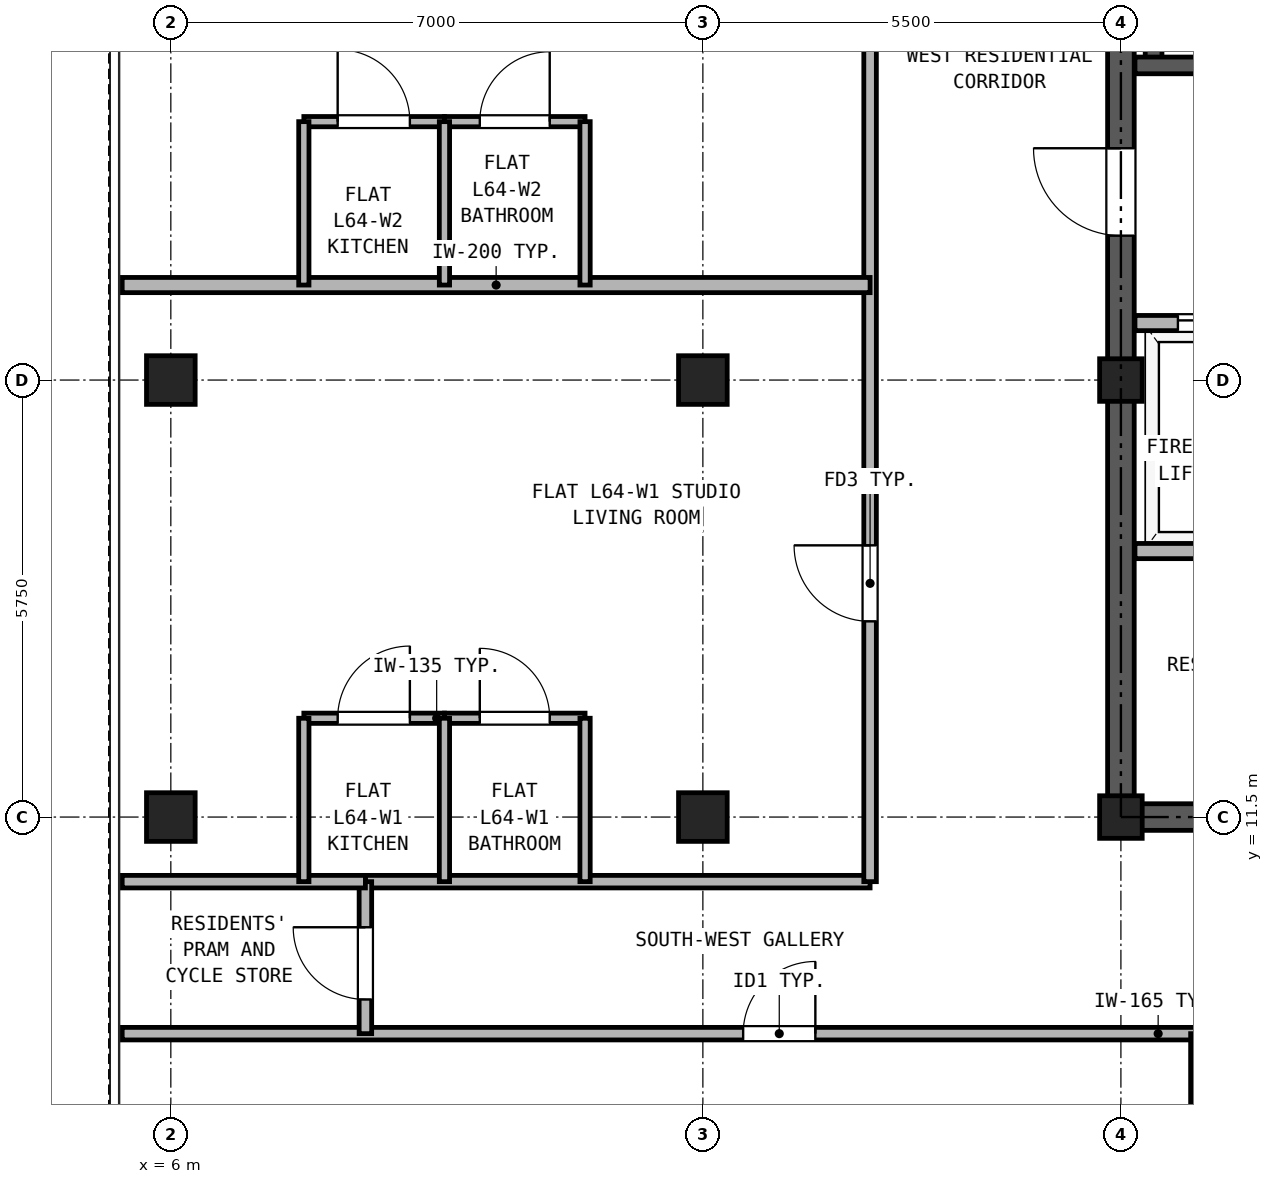
"""IFC4 building model, lengths in metres.
Left out: names, types, materials, properties, quantities, classifications, styles, units other than length and angle.
Written with IfcOpenShell. Run it as: python <this file> out.ifc"""

import sys

from ifc_helpers import new_model, si_unit, direction, frame, frame_2d, origin, origin_2d, place, context, subcontext, project, spatial, rectangle, hollow_rectangle, extrude, source, transform, mapped, element, fill, save


model = new_model("IFC4")
c1 = context("Model", 3, precision=1e-05, world=origin(), true_north=direction((0.0, 1.0)))
c2 = subcontext(c1, "Body", "Model", "MODEL_VIEW")
j1 = project(units=[si_unit("LENGTHUNIT", "METRE"), si_unit("PLANEANGLEUNIT", "RADIAN")], contexts=[c1])
p1 = place(None, origin())
s1 = spatial("IfcSite", under=j1, at=p1, CompositionType="ELEMENT")
p2 = place(p1, origin())
s2 = spatial("IfcBuilding", under=s1, at=p2, CompositionType="ELEMENT")
p3 = place(p2, frame((0.0, 0.0, 226.5)))
s3 = spatial("IfcBuildingStorey", under=s2, at=p3, CompositionType="ELEMENT", Elevation=226.5)
m1 = source(origin(), c2, "Body", "SweptSolid", [
    extrude(hollow_rectangle(XDim=0.64, YDim=0.64, WallThickness=0.035, at=origin_2d()), origin(), (0.0, 0.0, 1.0), 2.98),
])
for number, where, z_axis, x_axis in (
    (1, (6.0, 11.5, 0.0), (0.0, 0.0, 1.0), (1.0, 0.0, 0.0)),
    (2, (6.0, 17.25, 0.0), (0.0, 0.0, 1.0), (1.0, 0.0, 0.0)),
    (3, (13.0, 11.5, 0.0), (0.0, 0.0, 1.0), (1.0, 0.0, 0.0)),
    (4, (13.0, 17.25, 0.0), (0.0, 0.0, 1.0), (1.0, 0.0, 0.0)),
):
    element("IfcColumn", number, at=place(p3, frame(where, z_axis=z_axis, x_axis=x_axis)), inside=s3, PredefinedType="COLUMN", context=c2, shape_type="MappedRepresentation", body=[
        mapped(m1, transform((0.0, 0.0, 0.0), x_axis=(1.0, 0.0, 0.0), y_axis=(0.0, 1.0, 0.0), z_axis=(0.0, 0.0, 1.0), scale=1.0)),
    ])
m2 = source(origin(), c2, "Body", "SweptSolid", [
    extrude(hollow_rectangle(XDim=0.56, YDim=0.56, WallThickness=0.03, at=origin_2d()), origin(), (0.0, 0.0, 1.0), 2.98),
])
for number, where, z_axis, x_axis in (
    (5, (18.5, 11.5, 0.0), (0.0, 0.0, 1.0), (1.0, 0.0, 0.0)),
    (6, (18.5, 17.25, 0.0), (0.0, 0.0, 1.0), (1.0, 0.0, 0.0)),
):
    element("IfcColumn", number, at=place(p3, frame(where, z_axis=z_axis, x_axis=x_axis)), inside=s3, PredefinedType="COLUMN", context=c2, shape_type="MappedRepresentation", body=[
        mapped(m2, transform((0.0, 0.0, 0.0), x_axis=(1.0, 0.0, 0.0), y_axis=(0.0, 1.0, 0.0), z_axis=(0.0, 0.0, 1.0), scale=1.0)),
    ])
p4 = place(p3, frame((18.325, 11.5, 0.0), z_axis=(0.0, 0.0, 1.0), x_axis=(1.0, 0.0, 0.0)))
e7 = element("IfcWall", 7, at=p4, inside=s3, PredefinedType="SHEAR", context=c2, shape_type="SweptSolid", body=[
    extrude(rectangle(XDim=10.35, YDim=0.35, at=frame_2d((5.175, 0.0))), origin(), (0.0, 0.0, 1.0), 2.98),
])
p5 = place(p4, frame((1.775, 0.0, 0.0)))
e8 = element("IfcOpeningElement", 8, at=p5, cuts=e7, PredefinedType="OPENING", context=c2, shape_type="SweptSolid", body=[
    extrude(rectangle(XDim=0.95, YDim=2.15, at=frame_2d((0.475, 1.075))), frame((0.0, 0.185, 0.0), z_axis=(0.0, -1.0, 0.0), x_axis=(1.0, 0.0, 0.0)), (0.0, 0.0, 1.0), 0.37),
])
p6 = place(p4, frame((5.275, 0.0, 0.0)))
e9 = element("IfcOpeningElement", 9, at=p6, cuts=e7, PredefinedType="OPENING", context=c2, shape_type="SweptSolid", body=[
    extrude(rectangle(XDim=0.95, YDim=2.15, at=frame_2d((0.475, 1.075))), frame((0.0, 0.185, 0.0), z_axis=(0.0, -1.0, 0.0), x_axis=(1.0, 0.0, 0.0)), (0.0, 0.0, 1.0), 0.37),
])
p7 = place(p4, frame((8.175, 0.0, 0.0)))
e10 = element("IfcOpeningElement", 10, at=p7, cuts=e7, PredefinedType="OPENING", context=c2, shape_type="SweptSolid", body=[
    extrude(rectangle(XDim=1.1, YDim=2.25, at=frame_2d((0.55, 1.125))), frame((0.0, 0.185, 0.0), z_axis=(0.0, -1.0, 0.0), x_axis=(1.0, 0.0, 0.0)), (0.0, 0.0, 1.0), 0.37),
])
p8 = place(p3, frame((18.5, 11.675, 0.0), z_axis=(0.0, 0.0, 1.0), x_axis=(0.0, 1.0, 0.0)))
e11 = element("IfcWall", 11, at=p8, inside=s3, PredefinedType="SHEAR", context=c2, shape_type="SweptSolid", body=[
    extrude(rectangle(XDim=16.9, YDim=0.35, at=frame_2d((8.45, 0.0))), origin(), (0.0, 0.0, 1.0), 2.98),
])
p9 = place(p8, frame((7.475, 0.0, 0.0)))
e12 = element("IfcOpeningElement", 12, at=p9, cuts=e11, PredefinedType="OPENING", context=c2, shape_type="SweptSolid", body=[
    extrude(rectangle(XDim=1.15, YDim=2.2, at=frame_2d((0.575, 1.1))), frame((0.0, 0.185, 0.0), z_axis=(0.0, -1.0, 0.0), x_axis=(1.0, 0.0, 0.0)), (0.0, 0.0, 1.0), 0.37),
])
p10 = place(p3, frame((18.93, 21.39, 0.0), z_axis=(0.0, 0.0, 1.0), x_axis=(0.0, 1.0, 0.0)))
e13 = element("IfcWall", 13, at=p10, inside=s3, PredefinedType="SOLIDWALL", context=c2, shape_type="SweptSolid", body=[
    extrude(rectangle(XDim=7.11, YDim=0.22, at=frame_2d((3.555, 0.0))), origin(), (0.0, 0.0, 1.0), 2.98),
])
p11 = place(p3, frame((18.685, 21.39, 0.0), z_axis=(0.0, 0.0, 1.0), x_axis=(1.0, 0.0, 0.0)))
e14 = element("IfcWall", 14, at=p11, inside=s3, PredefinedType="SOLIDWALL", context=c2, shape_type="SweptSolid", body=[
    extrude(rectangle(XDim=6.445, YDim=0.22, at=frame_2d((3.222, 0.0))), origin(), (0.0, 0.0, 1.0), 2.98),
])
p12 = place(p11, frame((1.165, 0.0, 0.0)))
e15 = element("IfcOpeningElement", 15, at=p12, cuts=e14, PredefinedType="OPENING", context=c2, shape_type="SweptSolid", body=[
    extrude(rectangle(XDim=1.15, YDim=2.2, at=frame_2d((0.575, 1.1))), frame((0.0, 0.12, 0.0), z_axis=(0.0, -1.0, 0.0), x_axis=(1.0, 0.0, 0.0)), (0.0, 0.0, 1.0), 0.24),
])
p13 = place(p11, frame((4.895, 0.0, 0.0)))
e16 = element("IfcOpeningElement", 16, at=p13, cuts=e14, PredefinedType="OPENING", context=c2, shape_type="SweptSolid", body=[
    extrude(rectangle(XDim=1.1, YDim=2.25, at=frame_2d((0.55, 1.125))), frame((0.0, 0.12, 0.0), z_axis=(0.0, -1.0, 0.0), x_axis=(1.0, 0.0, 0.0)), (0.0, 0.0, 1.0), 0.24),
])
p14 = place(p3, frame((18.685, 18.0, 0.0), z_axis=(0.0, 0.0, 1.0), x_axis=(1.0, 0.0, 0.0)))
e17 = element("IfcWall", 17, at=p14, inside=s3, PredefinedType="PARTITIONING", context=c2, shape_type="SweptSolid", body=[
    extrude(rectangle(XDim=9.63, YDim=0.2, at=frame_2d((4.815, 0.0))), origin(), (0.0, 0.0, 1.0), 2.98),
])
p15 = place(p14, frame((0.565, 0.0, 0.0)))
e18 = element("IfcOpeningElement", 18, at=p15, cuts=e17, PredefinedType="OPENING", context=c2, shape_type="SweptSolid", body=[
    extrude(rectangle(XDim=1.3, YDim=2.3, at=frame_2d((0.65, 1.15))), frame((0.0, 0.11, 0.0), z_axis=(0.0, -1.0, 0.0), x_axis=(1.0, 0.0, 0.0)), (0.0, 0.0, 1.0), 0.22),
])
p16 = place(p14, frame((2.665, 0.0, 0.0)))
e19 = element("IfcOpeningElement", 19, at=p16, cuts=e17, PredefinedType="OPENING", context=c2, shape_type="SweptSolid", body=[
    extrude(rectangle(XDim=1.3, YDim=2.3, at=frame_2d((0.65, 1.15))), frame((0.0, 0.11, 0.0), z_axis=(0.0, -1.0, 0.0), x_axis=(1.0, 0.0, 0.0)), (0.0, 0.0, 1.0), 0.22),
])
p17 = place(p14, frame((5.085, 0.0, 0.0)))
e20 = element("IfcOpeningElement", 20, at=p17, cuts=e17, PredefinedType="OPENING", context=c2, shape_type="SweptSolid", body=[
    extrude(rectangle(XDim=0.9, YDim=2.05, at=frame_2d((0.45, 1.025))), frame((0.0, 0.11, 0.0), z_axis=(0.0, -1.0, 0.0), x_axis=(1.0, 0.0, 0.0)), (0.0, 0.0, 1.0), 0.22),
])
p18 = place(p14, frame((8.215, 0.0, 0.0)))
e21 = element("IfcOpeningElement", 21, at=p18, cuts=e17, PredefinedType="OPENING", context=c2, shape_type="SweptSolid", body=[
    extrude(rectangle(XDim=0.9, YDim=2.05, at=frame_2d((0.45, 1.025))), frame((0.0, 0.11, 0.0), z_axis=(0.0, -1.0, 0.0), x_axis=(1.0, 0.0, 0.0)), (0.0, 0.0, 1.0), 0.22),
])
p19 = place(p3, frame((18.685, 15.0, 0.0), z_axis=(0.0, 0.0, 1.0), x_axis=(1.0, 0.0, 0.0)))
e22 = element("IfcWall", 22, at=p19, inside=s3, PredefinedType="PARTITIONING", context=c2, shape_type="SweptSolid", body=[
    extrude(rectangle(XDim=9.63, YDim=0.2, at=frame_2d((4.815, 0.0))), origin(), (0.0, 0.0, 1.0), 2.98),
])
p20 = place(p3, frame((5.36, 8.65, 0.0), z_axis=(0.0, 0.0, 1.0), x_axis=(1.0, 0.0, 0.0)))
e23 = element("IfcWall", 23, at=p20, inside=s3, PredefinedType="PARTITIONING", context=c2, shape_type="SweptSolid", body=[
    extrude(rectangle(XDim=36.28, YDim=0.165, at=frame_2d((18.14, 0.0))), origin(), (0.0, 0.0, 1.0), 2.655),
])
p21 = place(p20, frame((8.17, 0.0, 0.0)))
e24 = element("IfcOpeningElement", 24, at=p21, cuts=e23, PredefinedType="OPENING", context=c2, shape_type="SweptSolid", body=[
    extrude(rectangle(XDim=0.95, YDim=2.15, at=frame_2d((0.475, 1.075))), frame((0.0, 0.093, 0.0), z_axis=(0.0, -1.0, 0.0), x_axis=(1.0, 0.0, 0.0)), (0.0, 0.0, 1.0), 0.185),
])
p22 = place(p20, frame((18.14, 0.0, 0.0)))
e25 = element("IfcOpeningElement", 25, at=p22, cuts=e23, PredefinedType="OPENING", context=c2, shape_type="SweptSolid", body=[
    extrude(rectangle(XDim=0.95, YDim=2.15, at=frame_2d((0.475, 1.075))), frame((0.0, 0.093, 0.0), z_axis=(0.0, -1.0, 0.0), x_axis=(1.0, 0.0, 0.0)), (0.0, 0.0, 1.0), 0.185),
])
p23 = place(p20, frame((25.14, 0.0, 0.0)))
e26 = element("IfcOpeningElement", 26, at=p23, cuts=e23, PredefinedType="OPENING", context=c2, shape_type="SweptSolid", body=[
    extrude(rectangle(XDim=0.95, YDim=2.15, at=frame_2d((0.475, 1.075))), frame((0.0, 0.093, 0.0), z_axis=(0.0, -1.0, 0.0), x_axis=(1.0, 0.0, 0.0)), (0.0, 0.0, 1.0), 0.185),
])
p24 = place(p20, frame((29.99, 0.0, 0.0)))
e27 = element("IfcOpeningElement", 27, at=p24, cuts=e23, PredefinedType="OPENING", context=c2, shape_type="SweptSolid", body=[
    extrude(rectangle(XDim=0.95, YDim=2.15, at=frame_2d((0.475, 1.075))), frame((0.0, 0.093, 0.0), z_axis=(0.0, -1.0, 0.0), x_axis=(1.0, 0.0, 0.0)), (0.0, 0.0, 1.0), 0.185),
])
p25 = place(p3, frame((8.56, 10.65, 0.0), z_axis=(0.0, 0.0, 1.0), x_axis=(1.0, 0.0, 0.0)))
e28 = element("IfcWall", 28, at=p25, inside=s3, PredefinedType="PARTITIONING", context=c2, shape_type="SweptSolid", body=[
    extrude(rectangle(XDim=6.64, YDim=0.165, at=frame_2d((3.32, 0.0))), origin(), (0.0, 0.0, 1.0), 2.98),
])
p26 = place(p3, frame((8.56, 8.65, 0.0), z_axis=(0.0, 0.0, 1.0), x_axis=(0.0, 1.0, 0.0)))
e29 = element("IfcWall", 29, at=p26, inside=s3, PredefinedType="PARTITIONING", context=c2, shape_type="SweptSolid", body=[
    extrude(rectangle(XDim=2.0, YDim=0.165, at=frame_2d((1.0, 0.0))), origin(), (0.0, 0.0, 1.0), 2.98),
])
p27 = place(p26, frame((0.45, 0.0, 0.0)))
e30 = element("IfcOpeningElement", 30, at=p27, cuts=e29, PredefinedType="OPENING", context=c2, shape_type="SweptSolid", body=[
    extrude(rectangle(XDim=0.95, YDim=2.15, at=frame_2d((0.475, 1.075))), frame((0.0, 0.093, 0.0), z_axis=(0.0, -1.0, 0.0), x_axis=(1.0, 0.0, 0.0)), (0.0, 0.0, 1.0), 0.185),
])
p28 = place(p3, frame((15.2, 10.65, 0.0), z_axis=(0.0, 0.0, 1.0), x_axis=(0.0, 1.0, 0.0)))
e31 = element("IfcWall", 31, at=p28, inside=s3, PredefinedType="PARTITIONING", context=c2, shape_type="SweptSolid", body=[
    extrude(rectangle(XDim=24.49, YDim=0.165, at=frame_2d((12.245, 0.0))), origin(), (0.0, 0.0, 1.0), 2.98),
])
p29 = place(p28, frame((3.425, 0.0, 0.0)))
e32 = element("IfcOpeningElement", 32, at=p29, cuts=e31, PredefinedType="OPENING", context=c2, shape_type="SweptSolid", body=[
    extrude(rectangle(XDim=1.0, YDim=2.15, at=frame_2d((0.5, 1.075))), frame((0.0, 0.093, 0.0), z_axis=(0.0, -1.0, 0.0), x_axis=(1.0, 0.0, 0.0)), (0.0, 0.0, 1.0), 0.185),
])
p30 = place(p28, frame((11.5, 0.0, 0.0)))
e33 = element("IfcOpeningElement", 33, at=p30, cuts=e31, PredefinedType="OPENING", context=c2, shape_type="SweptSolid", body=[
    extrude(rectangle(XDim=1.0, YDim=2.15, at=frame_2d((0.5, 1.075))), frame((0.0, 0.093, 0.0), z_axis=(0.0, -1.0, 0.0), x_axis=(1.0, 0.0, 0.0)), (0.0, 0.0, 1.0), 0.185),
])
p31 = place(p28, frame((18.15, 0.0, 0.0)))
e34 = element("IfcOpeningElement", 34, at=p31, cuts=e31, PredefinedType="OPENING", context=c2, shape_type="SweptSolid", body=[
    extrude(rectangle(XDim=1.0, YDim=2.15, at=frame_2d((0.5, 1.075))), frame((0.0, 0.093, 0.0), z_axis=(0.0, -1.0, 0.0), x_axis=(1.0, 0.0, 0.0)), (0.0, 0.0, 1.0), 0.185),
])
p32 = place(p3, frame((19.5, 0.16, 0.0), z_axis=(0.0, 0.0, 1.0), x_axis=(0.0, 1.0, 0.0)))
e35 = element("IfcWall", 35, at=p32, inside=s3, PredefinedType="PARTITIONING", context=c2, shape_type="SweptSolid", body=[
    extrude(rectangle(XDim=8.49, YDim=0.165, at=frame_2d((4.245, 0.0))), origin(), (0.0, 0.0, 1.0), 2.98),
])
p33 = place(p3, frame((5.36, 10.65, 0.0), z_axis=(0.0, 0.0, 1.0), x_axis=(1.0, 0.0, 0.0)))
e36 = element("IfcWall", 36, at=p33, inside=s3, PredefinedType="PARTITIONING", context=c2, shape_type="SweptSolid", body=[
    extrude(rectangle(XDim=3.2, YDim=0.165, at=frame_2d((1.6, 0.0))), origin(), (0.0, 0.0, 1.0), 2.98),
])
p34 = place(p3, frame((7.75, 12.8, 0.0), z_axis=(0.0, 0.0, 1.0), x_axis=(1.0, 0.0, 0.0)))
e37 = element("IfcWall", 37, at=p34, inside=s3, PredefinedType="PARTITIONING", context=c2, shape_type="SweptSolid", body=[
    extrude(rectangle(XDim=1.85, YDim=0.135, at=frame_2d((0.925, 0.0))), origin(), (0.0, 0.0, 1.0), 2.98),
])
p35 = place(p34, frame((0.445, 0.0, 0.0)))
e38 = element("IfcOpeningElement", 38, at=p35, cuts=e37, PredefinedType="OPENING", context=c2, shape_type="SweptSolid", body=[
    extrude(rectangle(XDim=0.95, YDim=2.15, at=frame_2d((0.475, 1.075))), frame((0.0, 0.077, 0.0), z_axis=(0.0, -1.0, 0.0), x_axis=(1.0, 0.0, 0.0)), (0.0, 0.0, 1.0), 0.155),
])
p36 = place(p3, frame((9.6, 12.8, 0.0), z_axis=(0.0, 0.0, 1.0), x_axis=(1.0, 0.0, 0.0)))
e39 = element("IfcWall", 39, at=p36, inside=s3, PredefinedType="PARTITIONING", context=c2, shape_type="SweptSolid", body=[
    extrude(rectangle(XDim=1.85, YDim=0.135, at=frame_2d((0.925, 0.0))), origin(), (0.0, 0.0, 1.0), 2.98),
])
p37 = place(p36, frame((0.465, 0.0, 0.0)))
e40 = element("IfcOpeningElement", 40, at=p37, cuts=e39, PredefinedType="OPENING", context=c2, shape_type="SweptSolid", body=[
    extrude(rectangle(XDim=0.92, YDim=2.1, at=frame_2d((0.46, 1.05))), frame((0.0, 0.077, 0.0), z_axis=(0.0, -1.0, 0.0), x_axis=(1.0, 0.0, 0.0)), (0.0, 0.0, 1.0), 0.155),
])
for number, where, z_axis, x_axis in (
    (41, (7.75, 10.65, 0.0), (0.0, 0.0, 1.0), (0.0, 1.0, 0.0)),
    (42, (9.6, 10.65, 0.0), (0.0, 0.0, 1.0), (0.0, 1.0, 0.0)),
    (43, (11.45, 10.65, 0.0), (0.0, 0.0, 1.0), (0.0, 1.0, 0.0)),
):
    element("IfcWall", number, at=place(p3, frame(where, z_axis=z_axis, x_axis=x_axis)), inside=s3, PredefinedType="PARTITIONING", context=c2, shape_type="SweptSolid", body=[
        extrude(rectangle(XDim=2.15, YDim=0.135, at=frame_2d((1.075, 0.0))), origin(), (0.0, 0.0, 1.0), 2.98),
    ])
p38 = place(p3, frame((5.36, 18.5, 0.0), z_axis=(0.0, 0.0, 1.0), x_axis=(1.0, 0.0, 0.0)))
e44 = element("IfcWall", 44, at=p38, inside=s3, PredefinedType="PARTITIONING", context=c2, shape_type="SweptSolid", body=[
    extrude(rectangle(XDim=9.84, YDim=0.2, at=frame_2d((4.92, 0.0))), origin(), (0.0, 0.0, 1.0), 2.98),
])
p39 = place(p3, frame((7.75, 20.65, 0.0), z_axis=(0.0, 0.0, 1.0), x_axis=(1.0, 0.0, 0.0)))
e45 = element("IfcWall", 45, at=p39, inside=s3, PredefinedType="PARTITIONING", context=c2, shape_type="SweptSolid", body=[
    extrude(rectangle(XDim=1.85, YDim=0.135, at=frame_2d((0.925, 0.0))), origin(), (0.0, 0.0, 1.0), 2.98),
])
p40 = place(p39, frame((0.445, 0.0, 0.0)))
e46 = element("IfcOpeningElement", 46, at=p40, cuts=e45, PredefinedType="OPENING", context=c2, shape_type="SweptSolid", body=[
    extrude(rectangle(XDim=0.95, YDim=2.15, at=frame_2d((0.475, 1.075))), frame((0.0, 0.077, 0.0), z_axis=(0.0, -1.0, 0.0), x_axis=(1.0, 0.0, 0.0)), (0.0, 0.0, 1.0), 0.155),
])
p41 = place(p3, frame((9.6, 20.65, 0.0), z_axis=(0.0, 0.0, 1.0), x_axis=(1.0, 0.0, 0.0)))
e47 = element("IfcWall", 47, at=p41, inside=s3, PredefinedType="PARTITIONING", context=c2, shape_type="SweptSolid", body=[
    extrude(rectangle(XDim=1.85, YDim=0.135, at=frame_2d((0.925, 0.0))), origin(), (0.0, 0.0, 1.0), 2.98),
])
p42 = place(p41, frame((0.465, 0.0, 0.0)))
e48 = element("IfcOpeningElement", 48, at=p42, cuts=e47, PredefinedType="OPENING", context=c2, shape_type="SweptSolid", body=[
    extrude(rectangle(XDim=0.92, YDim=2.1, at=frame_2d((0.46, 1.05))), frame((0.0, 0.077, 0.0), z_axis=(0.0, -1.0, 0.0), x_axis=(1.0, 0.0, 0.0)), (0.0, 0.0, 1.0), 0.155),
])
for number, where, z_axis, x_axis in (
    (49, (7.75, 18.5, 0.0), (0.0, 0.0, 1.0), (0.0, 1.0, 0.0)),
    (50, (9.6, 18.5, 0.0), (0.0, 0.0, 1.0), (0.0, 1.0, 0.0)),
    (51, (11.45, 18.5, 0.0), (0.0, 0.0, 1.0), (0.0, 1.0, 0.0)),
):
    element("IfcWall", number, at=place(p3, frame(where, z_axis=z_axis, x_axis=x_axis)), inside=s3, PredefinedType="PARTITIONING", context=c2, shape_type="SweptSolid", body=[
        extrude(rectangle(XDim=2.15, YDim=0.135, at=frame_2d((1.075, 0.0))), origin(), (0.0, 0.0, 1.0), 2.98),
    ])
p43 = place(p15, origin())
e52 = element("IfcDoor", 52, at=p43, inside=s3, OperationType="DOUBLE_DOOR_SLIDING", PredefinedType="DOOR", context=c2, shape_type="SweptSolid", body=[
    extrude(rectangle(XDim=1.3, YDim=2.3, at=frame_2d((0.65, 1.15))), frame((0.0, 0.025, 0.0), z_axis=(0.0, -1.0, 0.0), x_axis=(1.0, 0.0, 0.0)), (0.0, 0.0, 1.0), 0.05),
])
fill(e18, e52)
p44 = place(p9, frame((1.15, 0.0, 0.0), z_axis=(0.0, 0.0, 1.0), x_axis=(-1.0, 0.0, 0.0)))
e53 = element("IfcDoor", 53, at=p44, inside=s3, OperationType="SINGLE_SWING_RIGHT", PredefinedType="DOOR", context=c2, shape_type="SweptSolid", body=[
    extrude(rectangle(XDim=1.15, YDim=2.2, at=frame_2d((0.575, 1.1))), frame((0.0, 0.025, 0.0), z_axis=(0.0, -1.0, 0.0), x_axis=(1.0, 0.0, 0.0)), (0.0, 0.0, 1.0), 0.05),
])
fill(e12, e53)
p45 = place(p21, frame((0.95, 0.0, 0.0), z_axis=(0.0, 0.0, 1.0), x_axis=(-1.0, 0.0, 0.0)))
e54 = element("IfcDoor", 54, at=p45, inside=s3, OperationType="SINGLE_SWING_RIGHT", PredefinedType="DOOR", context=c2, shape_type="SweptSolid", body=[
    extrude(rectangle(XDim=0.95, YDim=2.15, at=frame_2d((0.475, 1.075))), frame((0.0, 0.025, 0.0), z_axis=(0.0, -1.0, 0.0), x_axis=(1.0, 0.0, 0.0)), (0.0, 0.0, 1.0), 0.05),
])
fill(e24, e54)
p46 = place(p27, frame((0.95, 0.0, 0.0), z_axis=(0.0, 0.0, 1.0), x_axis=(-1.0, 0.0, 0.0)))
e55 = element("IfcDoor", 55, at=p46, inside=s3, OperationType="SINGLE_SWING_RIGHT", PredefinedType="DOOR", context=c2, shape_type="SweptSolid", body=[
    extrude(rectangle(XDim=0.95, YDim=2.15, at=frame_2d((0.475, 1.075))), frame((0.0, 0.025, 0.0), z_axis=(0.0, -1.0, 0.0), x_axis=(1.0, 0.0, 0.0)), (0.0, 0.0, 1.0), 0.05),
])
fill(e30, e55)
p47 = place(p35, origin())
e56 = element("IfcDoor", 56, at=p47, inside=s3, OperationType="SINGLE_SWING_RIGHT", PredefinedType="DOOR", context=c2, shape_type="SweptSolid", body=[
    extrude(rectangle(XDim=0.95, YDim=2.15, at=frame_2d((0.475, 1.075))), frame((0.0, 0.025, 0.0), z_axis=(0.0, -1.0, 0.0), x_axis=(1.0, 0.0, 0.0)), (0.0, 0.0, 1.0), 0.05),
])
fill(e38, e56)
p48 = place(p37, origin())
e57 = element("IfcDoor", 57, at=p48, inside=s3, OperationType="SINGLE_SWING_LEFT", PredefinedType="DOOR", context=c2, shape_type="SweptSolid", body=[
    extrude(rectangle(XDim=0.92, YDim=2.1, at=frame_2d((0.46, 1.05))), frame((0.0, 0.025, 0.0), z_axis=(0.0, -1.0, 0.0), x_axis=(1.0, 0.0, 0.0)), (0.0, 0.0, 1.0), 0.05),
])
fill(e40, e57)
p49 = place(p29, origin())
e58 = element("IfcDoor", 58, at=p49, inside=s3, OperationType="SINGLE_SWING_RIGHT", PredefinedType="DOOR", context=c2, shape_type="SweptSolid", body=[
    extrude(rectangle(XDim=1.0, YDim=2.15, at=frame_2d((0.5, 1.075))), frame((0.0, 0.025, 0.0), z_axis=(0.0, -1.0, 0.0), x_axis=(1.0, 0.0, 0.0)), (0.0, 0.0, 1.0), 0.05),
])
fill(e32, e58)
p50 = place(p40, origin())
e59 = element("IfcDoor", 59, at=p50, inside=s3, OperationType="SINGLE_SWING_LEFT", PredefinedType="DOOR", context=c2, shape_type="SweptSolid", body=[
    extrude(rectangle(XDim=0.95, YDim=2.15, at=frame_2d((0.475, 1.075))), frame((0.0, 0.025, 0.0), z_axis=(0.0, -1.0, 0.0), x_axis=(1.0, 0.0, 0.0)), (0.0, 0.0, 1.0), 0.05),
])
fill(e46, e59)
p51 = place(p42, origin())
e60 = element("IfcDoor", 60, at=p51, inside=s3, OperationType="SINGLE_SWING_RIGHT", PredefinedType="DOOR", context=c2, shape_type="SweptSolid", body=[
    extrude(rectangle(XDim=0.92, YDim=2.1, at=frame_2d((0.46, 1.05))), frame((0.0, 0.025, 0.0), z_axis=(0.0, -1.0, 0.0), x_axis=(1.0, 0.0, 0.0)), (0.0, 0.0, 1.0), 0.05),
])
fill(e48, e60)
save(model, sys.argv[1])
